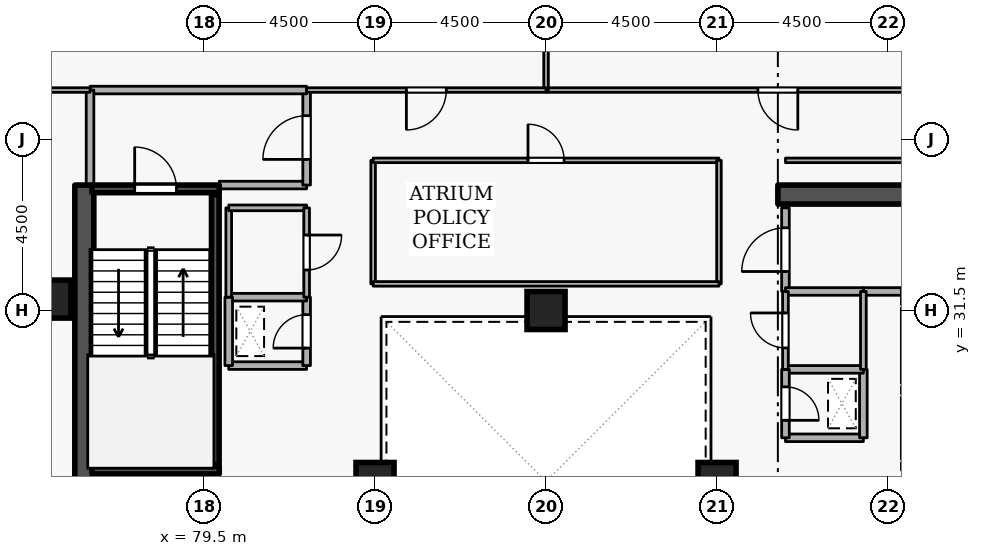
"""IFC4 building model, lengths in metres.
Left out: names, types, materials, properties, quantities, classifications, styles, units other than length and angle.
Written with IfcOpenShell. Run it as: python <this file> out.ifc"""

import sys

from ifc_helpers import new_model, si_unit, direction, frame, frame_2d, origin, origin_2d, place, context, subcontext, project, spatial, rectangle, extrude, element, fill, save


model = new_model("IFC4")
c1 = context("Model", 3, precision=1e-05, world=origin(), true_north=direction((0.0, 1.0)))
c2 = subcontext(c1, "Body", "Model", "MODEL_VIEW")
j1 = project(units=[si_unit("LENGTHUNIT", "METRE"), si_unit("PLANEANGLEUNIT", "RADIAN")], contexts=[c1])
p1 = place(None, origin())
s1 = spatial("IfcSite", under=j1, at=p1, CompositionType="ELEMENT")
p2 = place(p1, origin())
s2 = spatial("IfcBuilding", under=s1, at=p2, CompositionType="ELEMENT")
p3 = place(p2, frame((0.0, 0.0, 203.7)))
s3 = spatial("IfcBuildingStorey", under=s2, at=p3, CompositionType="ELEMENT", Elevation=203.7)
p4 = place(p3, frame((94.6, 34.55, 0.0), z_axis=(0.0, 0.0, 1.0), x_axis=(1.0, 0.0, 0.0)))
e1 = element("IfcWall", 1, at=p4, inside=s3, PredefinedType="SHEAR", context=c2, shape_type="SweptSolid", body=[
    extrude(rectangle(XDim=5.8, YDim=0.5, at=frame_2d((2.9, 0.0))), origin(), (0.0, 0.0, 1.0), 3.6),
])
p5 = place(p3, frame((76.35, 19.2, 0.0), z_axis=(0.0, 0.0, 1.0), x_axis=(0.0, 1.0, 0.0)))
e2 = element("IfcWall", 2, at=p5, inside=s3, PredefinedType="SHEAR", context=c2, shape_type="SweptSolid", body=[
    extrude(rectangle(XDim=15.6, YDim=0.5, at=frame_2d((7.8, 0.0))), origin(), (0.0, 0.0, 1.0), 3.6),
])
for number, where, z_axis, x_axis in (
    (3, (75.5, 31.8, 0.0), (0.0, 0.0, 1.0), (1.0, 0.0, 0.0)),
    (4, (93.0, 27.0, 0.0), (0.0, 0.0, 1.0), (1.0, 0.0, 0.0)),
    (5, (84.0, 27.0, 0.0), (0.0, 0.0, 1.0), (1.0, 0.0, 0.0)),
    (6, (88.5, 31.5, 0.0), (0.0, 0.0, 1.0), (1.0, 0.0, 0.0)),
):
    element("IfcColumn", number, at=place(p3, frame(where, z_axis=z_axis, x_axis=x_axis)), inside=s3, PredefinedType="COLUMN", context=c2, shape_type="SweptSolid", body=[
        extrude(rectangle(XDim=1.0, YDim=1.0, at=origin_2d()), origin(), (0.0, 0.0, 1.0), 3.6),
    ])
p6 = place(p3, frame((97.95, 29.22, 0.0), z_axis=(0.0, 0.0, 1.0), x_axis=(0.0, -1.0, 0.0)))
e7 = element("IfcWall", 7, at=p6, inside=s3, PredefinedType="STANDARD", context=c2, shape_type="SweptSolid", body=[
    extrude(rectangle(XDim=1.64, YDim=0.2, at=frame_2d((0.82, 0.0))), origin(), (0.0, 0.0, 1.0), 3.34),
])
p7 = place(p6, frame((0.31, 0.0, 0.0)))
e8 = element("IfcOpeningElement", 8, at=p7, cuts=e7, PredefinedType="OPENING", context=c2, shape_type="SweptSolid", body=[
    extrude(rectangle(XDim=1.02, YDim=2.06, at=frame_2d((0.51, 1.03))), frame((0.0, 0.11, 0.0), z_axis=(0.0, -1.0, 0.0), x_axis=(1.0, 0.0, 0.0)), (0.0, 0.0, 1.0), 0.22),
])
p8 = place(p3, frame((97.95, 31.57, 0.0), z_axis=(0.0, 0.0, 1.0), x_axis=(0.0, -1.0, 0.0)))
e9 = element("IfcWall", 9, at=p8, inside=s3, PredefinedType="STANDARD", context=c2, shape_type="SweptSolid", body=[
    extrude(rectangle(XDim=1.99, YDim=0.2, at=frame_2d((0.995, 0.0))), origin(), (0.0, 0.0, 1.0), 3.34),
])
p9 = place(p8, frame((0.485, 0.0, 0.0)))
e10 = element("IfcOpeningElement", 10, at=p9, cuts=e9, PredefinedType="OPENING", context=c2, shape_type="SweptSolid", body=[
    extrude(rectangle(XDim=1.02, YDim=2.06, at=frame_2d((0.51, 1.03))), frame((0.0, 0.11, 0.0), z_axis=(0.0, -1.0, 0.0), x_axis=(1.0, 0.0, 0.0)), (0.0, 0.0, 1.0), 0.22),
])
p10 = place(p3, frame((76.55, 34.7, 0.0), z_axis=(0.0, 0.0, 1.0), x_axis=(1.0, 0.0, 0.0)))
e11 = element("IfcWall", 11, at=p10, inside=s3, PredefinedType="SHEAR", context=c2, shape_type="SweptSolid", body=[
    extrude(rectangle(XDim=3.35, YDim=0.2, at=frame_2d((1.675, 0.0))), origin(), (0.0, 0.0, 1.0), 3.6),
])
p11 = place(p10, frame((1.125, 0.0, 0.0)))
e12 = element("IfcOpeningElement", 12, at=p11, cuts=e11, PredefinedType="OPENING", context=c2, shape_type="SweptSolid", body=[
    extrude(rectangle(XDim=1.1, YDim=2.1, at=frame_2d((0.55, 1.05))), frame((0.0, 0.11, 0.0), z_axis=(0.0, -1.0, 0.0), x_axis=(1.0, 0.0, 0.0)), (0.0, 0.0, 1.0), 0.22),
])
p12 = place(p3, frame((79.9, 27.3, 0.0), z_axis=(0.0, 0.0, 1.0), x_axis=(-1.0, 0.0, 0.0)))
e13 = element("IfcWall", 13, at=p12, inside=s3, PredefinedType="SHEAR", context=c2, shape_type="SweptSolid", body=[
    extrude(rectangle(XDim=3.35, YDim=0.2, at=frame_2d((1.675, 0.0))), origin(), (0.0, 0.0, 1.0), 3.6),
])
p13 = place(p3, frame((79.797, 27.45, 0.0), z_axis=(0.0, 0.0, 1.0), x_axis=(0.0, 1.0, 0.0)))
e14 = element("IfcWall", 14, at=p13, inside=s3, PredefinedType="SHEAR", context=c2, shape_type="SweptSolid", body=[
    extrude(rectangle(XDim=7.1, YDim=0.2, at=frame_2d((3.55, 0.0))), origin(), (0.0, 0.0, 1.0), 3.6),
])
p14 = place(p3, frame((79.9, 34.8, 0.0), z_axis=(0.0, 0.0, 1.0), x_axis=(1.0, 0.0, 0.0)))
e15 = element("IfcWall", 15, at=p14, inside=s3, PredefinedType="STANDARD", context=c2, shape_type="SweptSolid", body=[
    extrude(rectangle(XDim=2.3, YDim=0.2, at=frame_2d((1.15, 0.0))), origin(), (0.0, 0.0, 1.0), 2.545),
])
p15 = place(p3, frame((82.2, 34.8, 0.0), z_axis=(0.0, 0.0, 1.0), x_axis=(0.0, 1.0, 0.0)))
e16 = element("IfcWall", 16, at=p15, inside=s3, PredefinedType="STANDARD", context=c2, shape_type="SweptSolid", body=[
    extrude(rectangle(XDim=2.5, YDim=0.2, at=frame_2d((1.25, 0.0))), origin(), (0.0, 0.0, 1.0), 3.34),
])
p16 = place(p15, frame((0.675, 0.0, 0.0)))
e17 = element("IfcOpeningElement", 17, at=p16, cuts=e16, PredefinedType="OPENING", context=c2, shape_type="SweptSolid", body=[
    extrude(rectangle(XDim=1.15, YDim=2.1, at=frame_2d((0.575, 1.05))), frame((0.0, 0.11, 0.0), z_axis=(0.0, -1.0, 0.0), x_axis=(1.0, 0.0, 0.0)), (0.0, 0.0, 1.0), 0.22),
])
p17 = place(p3, frame((82.2, 37.3, 0.0), z_axis=(0.0, 0.0, 1.0), x_axis=(-1.0, 0.0, 0.0)))
e18 = element("IfcWall", 18, at=p17, inside=s3, PredefinedType="STANDARD", context=c2, shape_type="SweptSolid", body=[
    extrude(rectangle(XDim=5.7, YDim=0.2, at=frame_2d((2.85, 0.0))), origin(), (0.0, 0.0, 1.0), 3.34),
])
p18 = place(p3, frame((76.5, 37.3, 0.0), z_axis=(0.0, 0.0, 1.0), x_axis=(0.0, -1.0, 0.0)))
e19 = element("IfcWall", 19, at=p18, inside=s3, PredefinedType="STANDARD", context=c2, shape_type="SweptSolid", body=[
    extrude(rectangle(XDim=2.5, YDim=0.2, at=frame_2d((1.25, 0.0))), origin(), (0.0, 0.0, 1.0), 3.34),
])
p19 = place(p3, frame((94.8, 28.15, 0.0), z_axis=(0.0, 0.0, 1.0), x_axis=(1.0, 0.0, 0.0)))
e20 = element("IfcWall", 20, at=p19, inside=s3, PredefinedType="STANDARD", context=c2, shape_type="SweptSolid", body=[
    extrude(rectangle(XDim=2.05, YDim=0.2, at=frame_2d((1.025, 0.0))), origin(), (0.0, 0.0, 1.0), 3.34),
])
p20 = place(p3, frame((96.85, 28.15, 0.0), z_axis=(0.0, 0.0, 1.0), x_axis=(0.0, 1.0, 0.0)))
e21 = element("IfcWall", 21, at=p20, inside=s3, PredefinedType="STANDARD", context=c2, shape_type="SweptSolid", body=[
    extrude(rectangle(XDim=1.8, YDim=0.2, at=frame_2d((0.9, 0.0))), origin(), (0.0, 0.0, 1.0), 3.34),
])
p21 = place(p3, frame((96.85, 29.95, 0.0), z_axis=(0.0, 0.0, 1.0), x_axis=(-1.0, 0.0, 0.0)))
e22 = element("IfcWall", 22, at=p21, inside=s3, PredefinedType="STANDARD", context=c2, shape_type="SweptSolid", body=[
    extrude(rectangle(XDim=2.05, YDim=0.2, at=frame_2d((1.025, 0.0))), origin(), (0.0, 0.0, 1.0), 3.34),
])
p22 = place(p3, frame((94.8, 29.95, 0.0), z_axis=(0.0, 0.0, 1.0), x_axis=(0.0, -1.0, 0.0)))
e23 = element("IfcWall", 23, at=p22, inside=s3, PredefinedType="STANDARD", context=c2, shape_type="SweptSolid", body=[
    extrude(rectangle(XDim=1.8, YDim=0.2, at=frame_2d((0.9, 0.0))), origin(), (0.0, 0.0, 1.0), 3.34),
])
p23 = place(p22, frame((0.46, 0.0, 0.0)))
e24 = element("IfcOpeningElement", 24, at=p23, cuts=e23, PredefinedType="OPENING", context=c2, shape_type="SweptSolid", body=[
    extrude(rectangle(XDim=0.88, YDim=2.04, at=frame_2d((0.44, 1.02))), frame((0.0, 0.11, 0.0), z_axis=(0.0, -1.0, 0.0), x_axis=(1.0, 0.0, 0.0)), (0.0, 0.0, 1.0), 0.22),
])
p24 = place(p3, frame((80.15, 30.05, 0.0), z_axis=(0.0, 0.0, 1.0), x_axis=(1.0, 0.0, 0.0)))
e25 = element("IfcWall", 25, at=p24, inside=s3, PredefinedType="STANDARD", context=c2, shape_type="SweptSolid", body=[
    extrude(rectangle(XDim=2.05, YDim=0.2, at=frame_2d((1.025, 0.0))), origin(), (0.0, 0.0, 1.0), 3.34),
])
p25 = place(p3, frame((82.2, 30.05, 0.0), z_axis=(0.0, 0.0, 1.0), x_axis=(0.0, 1.0, 0.0)))
e26 = element("IfcWall", 26, at=p25, inside=s3, PredefinedType="STANDARD", context=c2, shape_type="SweptSolid", body=[
    extrude(rectangle(XDim=1.8, YDim=0.2, at=frame_2d((0.9, 0.0))), origin(), (0.0, 0.0, 1.0), 3.34),
])
p26 = place(p25, frame((0.46, 0.0, 0.0)))
e27 = element("IfcOpeningElement", 27, at=p26, cuts=e26, PredefinedType="OPENING", context=c2, shape_type="SweptSolid", body=[
    extrude(rectangle(XDim=0.88, YDim=2.04, at=frame_2d((0.44, 1.02))), frame((0.0, 0.11, 0.0), z_axis=(0.0, -1.0, 0.0), x_axis=(1.0, 0.0, 0.0)), (0.0, 0.0, 1.0), 0.22),
])
p27 = place(p3, frame((82.2, 31.85, 0.0), z_axis=(0.0, 0.0, 1.0), x_axis=(-1.0, 0.0, 0.0)))
e28 = element("IfcWall", 28, at=p27, inside=s3, PredefinedType="STANDARD", context=c2, shape_type="SweptSolid", body=[
    extrude(rectangle(XDim=2.05, YDim=0.2, at=frame_2d((1.025, 0.0))), origin(), (0.0, 0.0, 1.0), 3.34),
])
p28 = place(p3, frame((80.15, 31.85, 0.0), z_axis=(0.0, 0.0, 1.0), x_axis=(0.0, -1.0, 0.0)))
e29 = element("IfcWall", 29, at=p28, inside=s3, PredefinedType="STANDARD", context=c2, shape_type="SweptSolid", body=[
    extrude(rectangle(XDim=1.8, YDim=0.2, at=frame_2d((0.9, 0.0))), origin(), (0.0, 0.0, 1.0), 3.34),
])
p29 = place(p3, frame((94.8, 32.0, 0.0), z_axis=(0.0, 0.0, 1.0), x_axis=(0.0, 1.0, 0.0)))
e30 = element("IfcWall", 30, at=p29, inside=s3, PredefinedType="STANDARD", context=c2, shape_type="SweptSolid", body=[
    extrude(rectangle(XDim=2.2, YDim=0.2, at=frame_2d((1.1, 0.0))), origin(), (0.0, 0.0, 1.0), 3.34),
])
p30 = place(p29, frame((0.525, 0.0, 0.0)))
e31 = element("IfcOpeningElement", 31, at=p30, cuts=e30, PredefinedType="OPENING", context=c2, shape_type="SweptSolid", body=[
    extrude(rectangle(XDim=1.15, YDim=2.1, at=frame_2d((0.575, 1.05))), frame((0.0, 0.11, 0.0), z_axis=(0.0, -1.0, 0.0), x_axis=(1.0, 0.0, 0.0)), (0.0, 0.0, 1.0), 0.22),
])
p31 = place(p3, frame((97.852, 32.0, 0.0), z_axis=(0.0, 0.0, 1.0), x_axis=(-1.0, 0.0, 0.0)))
e32 = element("IfcWall", 32, at=p31, inside=s3, PredefinedType="STANDARD", context=c2, shape_type="SweptSolid", body=[
    extrude(rectangle(XDim=1.002, YDim=0.2, at=frame_2d((0.501, 0.0))), origin(), (0.0, 0.0, 1.0), 3.34),
])
p32 = place(p3, frame((96.85, 32.0, 0.0), z_axis=(0.0, 0.0, 1.0), x_axis=(-1.0, 0.0, 0.0)))
e33 = element("IfcWall", 33, at=p32, inside=s3, PredefinedType="STANDARD", context=c2, shape_type="SweptSolid", body=[
    extrude(rectangle(XDim=2.05, YDim=0.2, at=frame_2d((1.025, 0.0))), origin(), (0.0, 0.0, 1.0), 3.34),
])
p33 = place(p3, frame((94.8, 29.95, 0.0), z_axis=(0.0, 0.0, 1.0), x_axis=(0.0, 1.0, 0.0)))
e34 = element("IfcWall", 34, at=p33, inside=s3, PredefinedType="PARTITIONING", context=c2, shape_type="SweptSolid", body=[
    extrude(rectangle(XDim=2.05, YDim=0.15, at=frame_2d((1.025, 0.0))), origin(), (0.0, 0.0, 1.0), 3.34),
])
p34 = place(p33, frame((0.565, 0.0, 0.0)))
e35 = element("IfcOpeningElement", 35, at=p34, cuts=e34, PredefinedType="OPENING", context=c2, shape_type="SweptSolid", body=[
    extrude(rectangle(XDim=0.92, YDim=2.08, at=frame_2d((0.46, 1.04))), frame((0.0, 0.085, 0.0), z_axis=(0.0, -1.0, 0.0), x_axis=(1.0, 0.0, 0.0)), (0.0, 0.0, 1.0), 0.17),
])
p35 = place(p3, frame((96.85, 32.0, 0.0), z_axis=(0.0, 0.0, 1.0), x_axis=(0.0, -1.0, 0.0)))
e36 = element("IfcWall", 36, at=p35, inside=s3, PredefinedType="PARTITIONING", context=c2, shape_type="SweptSolid", body=[
    extrude(rectangle(XDim=2.05, YDim=0.15, at=frame_2d((1.025, 0.0))), origin(), (0.0, 0.0, 1.0), 3.34),
])
p36 = place(p3, frame((80.15, 31.85, 0.0), z_axis=(0.0, 0.0, 1.0), x_axis=(0.0, 1.0, 0.0)))
e37 = element("IfcWall", 37, at=p36, inside=s3, PredefinedType="PARTITIONING", context=c2, shape_type="SweptSolid", body=[
    extrude(rectangle(XDim=2.35, YDim=0.15, at=frame_2d((1.175, 0.0))), origin(), (0.0, 0.0, 1.0), 3.34),
])
p37 = place(p3, frame((80.15, 34.2, 0.0), z_axis=(0.0, 0.0, 1.0), x_axis=(1.0, 0.0, 0.0)))
e38 = element("IfcWall", 38, at=p37, inside=s3, PredefinedType="PARTITIONING", context=c2, shape_type="SweptSolid", body=[
    extrude(rectangle(XDim=2.05, YDim=0.15, at=frame_2d((1.025, 0.0))), origin(), (0.0, 0.0, 1.0), 2.545),
])
p38 = place(p3, frame((82.2, 34.2, 0.0), z_axis=(0.0, 0.0, 1.0), x_axis=(0.0, -1.0, 0.0)))
e39 = element("IfcWall", 39, at=p38, inside=s3, PredefinedType="PARTITIONING", context=c2, shape_type="SweptSolid", body=[
    extrude(rectangle(XDim=2.35, YDim=0.15, at=frame_2d((1.175, 0.0))), origin(), (0.0, 0.0, 1.0), 3.34),
])
p39 = place(p38, frame((0.715, 0.0, 0.0)))
e40 = element("IfcOpeningElement", 40, at=p39, cuts=e39, PredefinedType="OPENING", context=c2, shape_type="SweptSolid", body=[
    extrude(rectangle(XDim=0.92, YDim=2.08, at=frame_2d((0.46, 1.04))), frame((0.0, 0.085, 0.0), z_axis=(0.0, -1.0, 0.0), x_axis=(1.0, 0.0, 0.0)), (0.0, 0.0, 1.0), 0.17),
])
p40 = place(p3, frame((94.8, 35.45, 0.0), z_axis=(0.0, 0.0, 1.0), x_axis=(1.0, 0.0, 0.0)))
e41 = element("IfcWall", 41, at=p40, inside=s3, PredefinedType="PARTITIONING", context=c2, shape_type="SweptSolid", body=[
    extrude(rectangle(XDim=5.9, YDim=0.12, at=frame_2d((2.95, 0.0))), origin(), (0.0, 0.0, 1.0), 3.34),
])
p41 = place(p3, frame((100.7, 37.3, 0.0), z_axis=(0.0, 0.0, 1.0), x_axis=(-1.0, 0.0, 0.0)))
e42 = element("IfcWall", 42, at=p41, inside=s3, PredefinedType="PARTITIONING", context=c2, shape_type="SweptSolid", body=[
    extrude(rectangle(XDim=12.2, YDim=0.12, at=frame_2d((6.1, 0.0))), origin(), (0.0, 0.0, 1.0), 3.34),
])
p42 = place(p41, frame((5.575, 0.0, 0.0)))
e43 = element("IfcOpeningElement", 43, at=p42, cuts=e42, PredefinedType="OPENING", context=c2, shape_type="SweptSolid", body=[
    extrude(rectangle(XDim=1.05, YDim=2.1, at=frame_2d((0.525, 1.05))), frame((0.0, 0.07, 0.0), z_axis=(0.0, -1.0, 0.0), x_axis=(1.0, 0.0, 0.0)), (0.0, 0.0, 1.0), 0.14),
])
p43 = place(p3, frame((88.5, 37.3, 0.0), z_axis=(0.0, 0.0, 1.0), x_axis=(0.0, 1.0, 0.0)))
e44 = element("IfcWall", 44, at=p43, inside=s3, PredefinedType="PARTITIONING", context=c2, shape_type="SweptSolid", body=[
    extrude(rectangle(XDim=7.42, YDim=0.12, at=frame_2d((3.71, 0.0))), origin(), (0.0, 0.0, 1.0), 2.932),
])
p44 = place(p3, frame((76.5, 37.3, 0.0), z_axis=(0.0, 0.0, 1.0), x_axis=(-1.0, 0.0, 0.0)))
e45 = element("IfcWall", 45, at=p44, inside=s3, PredefinedType="PARTITIONING", context=c2, shape_type="SweptSolid", body=[
    extrude(rectangle(XDim=11.72, YDim=0.12, at=frame_2d((5.86, 0.0))), origin(), (0.0, 0.0, 1.0), 3.34),
])
p45 = place(p3, frame((88.5, 37.3, 0.0), z_axis=(0.0, 0.0, 1.0), x_axis=(-1.0, 0.0, 0.0)))
e46 = element("IfcWall", 46, at=p45, inside=s3, PredefinedType="PARTITIONING", context=c2, shape_type="SweptSolid", body=[
    extrude(rectangle(XDim=6.3, YDim=0.12, at=frame_2d((3.15, 0.0))), origin(), (0.0, 0.0, 1.0), 3.34),
])
p46 = place(p45, frame((2.625, 0.0, 0.0)))
e47 = element("IfcOpeningElement", 47, at=p46, cuts=e46, PredefinedType="OPENING", context=c2, shape_type="SweptSolid", body=[
    extrude(rectangle(XDim=1.05, YDim=2.1, at=frame_2d((0.525, 1.05))), frame((0.0, 0.07, 0.0), z_axis=(0.0, -1.0, 0.0), x_axis=(1.0, 0.0, 0.0)), (0.0, 0.0, 1.0), 0.14),
])
p47 = place(p3, frame((83.95, 32.2, 0.0), z_axis=(0.0, 0.0, 1.0), x_axis=(0.0, 1.0, 0.0)))
e48 = element("IfcWall", 48, at=p47, inside=s3, PredefinedType="PARTITIONING", context=c2, shape_type="SweptSolid", body=[
    extrude(rectangle(XDim=3.25, YDim=0.12, at=frame_2d((1.625, 0.0))), origin(), (0.0, 0.0, 1.0), 3.34),
])
p48 = place(p3, frame((83.95, 35.45, 0.0), z_axis=(0.0, 0.0, 1.0), x_axis=(1.0, 0.0, 0.0)))
e49 = element("IfcWall", 49, at=p48, inside=s3, PredefinedType="PARTITIONING", context=c2, shape_type="SweptSolid", body=[
    extrude(rectangle(XDim=9.1, YDim=0.12, at=frame_2d((4.55, 0.0))), origin(), (0.0, 0.0, 1.0), 3.34),
])
p49 = place(p48, frame((4.075, 0.0, 0.0)))
e50 = element("IfcOpeningElement", 50, at=p49, cuts=e49, PredefinedType="OPENING", context=c2, shape_type="SweptSolid", body=[
    extrude(rectangle(XDim=0.95, YDim=2.1, at=frame_2d((0.475, 1.05))), frame((0.0, 0.07, 0.0), z_axis=(0.0, -1.0, 0.0), x_axis=(1.0, 0.0, 0.0)), (0.0, 0.0, 1.0), 0.14),
])
p50 = place(p3, frame((93.05, 35.45, 0.0), z_axis=(0.0, 0.0, 1.0), x_axis=(0.0, -1.0, 0.0)))
e51 = element("IfcWall", 51, at=p50, inside=s3, PredefinedType="PARTITIONING", context=c2, shape_type="SweptSolid", body=[
    extrude(rectangle(XDim=3.25, YDim=0.12, at=frame_2d((1.625, 0.0))), origin(), (0.0, 0.0, 1.0), 3.34),
])
p51 = place(p3, frame((93.05, 32.2, 0.0), z_axis=(0.0, 0.0, 1.0), x_axis=(-1.0, 0.0, 0.0)))
e52 = element("IfcWall", 52, at=p51, inside=s3, PredefinedType="PARTITIONING", context=c2, shape_type="SweptSolid", body=[
    extrude(rectangle(XDim=9.1, YDim=0.12, at=frame_2d((4.55, 0.0))), origin(), (0.0, 0.0, 1.0), 3.34),
])
p52 = place(p11, origin())
e53 = element("IfcDoor", 53, at=p52, inside=s3, OperationType="SINGLE_SWING_LEFT", PredefinedType="DOOR", context=c2, shape_type="SweptSolid", body=[
    extrude(rectangle(XDim=1.1, YDim=2.1, at=frame_2d((0.55, 1.05))), frame((0.0, 0.025, 0.0), z_axis=(0.0, -1.0, 0.0), x_axis=(1.0, 0.0, 0.0)), (0.0, 0.0, 1.0), 0.05),
])
fill(e12, e53)
p53 = place(p16, origin())
e54 = element("IfcDoor", 54, at=p53, inside=s3, OperationType="SINGLE_SWING_LEFT", PredefinedType="DOOR", context=c2, shape_type="SweptSolid", body=[
    extrude(rectangle(XDim=1.15, YDim=2.1, at=frame_2d((0.575, 1.05))), frame((0.0, 0.025, 0.0), z_axis=(0.0, -1.0, 0.0), x_axis=(1.0, 0.0, 0.0)), (0.0, 0.0, 1.0), 0.05),
])
fill(e17, e54)
p54 = place(p23, origin())
e55 = element("IfcDoor", 55, at=p54, inside=s3, OperationType="SINGLE_SWING_RIGHT", PredefinedType="DOOR", context=c2, shape_type="SweptSolid", body=[
    extrude(rectangle(XDim=0.88, YDim=2.04, at=frame_2d((0.44, 1.02))), frame((0.0, 0.025, 0.0), z_axis=(0.0, -1.0, 0.0), x_axis=(1.0, 0.0, 0.0)), (0.0, 0.0, 1.0), 0.05),
])
fill(e24, e55)
p55 = place(p26, origin())
e56 = element("IfcDoor", 56, at=p55, inside=s3, OperationType="SINGLE_SWING_LEFT", PredefinedType="DOOR", context=c2, shape_type="SweptSolid", body=[
    extrude(rectangle(XDim=0.88, YDim=2.04, at=frame_2d((0.44, 1.02))), frame((0.0, 0.025, 0.0), z_axis=(0.0, -1.0, 0.0), x_axis=(1.0, 0.0, 0.0)), (0.0, 0.0, 1.0), 0.05),
])
fill(e27, e56)
p56 = place(p34, origin())
e57 = element("IfcDoor", 57, at=p56, inside=s3, OperationType="SINGLE_SWING_RIGHT", PredefinedType="DOOR", context=c2, shape_type="SweptSolid", body=[
    extrude(rectangle(XDim=0.92, YDim=2.08, at=frame_2d((0.46, 1.04))), frame((0.0, 0.025, 0.0), z_axis=(0.0, -1.0, 0.0), x_axis=(1.0, 0.0, 0.0)), (0.0, 0.0, 1.0), 0.05),
])
fill(e35, e57)
p57 = place(p30, origin())
e58 = element("IfcDoor", 58, at=p57, inside=s3, OperationType="SINGLE_SWING_LEFT", PredefinedType="DOOR", context=c2, shape_type="SweptSolid", body=[
    extrude(rectangle(XDim=1.15, YDim=2.1, at=frame_2d((0.575, 1.05))), frame((0.0, 0.025, 0.0), z_axis=(0.0, -1.0, 0.0), x_axis=(1.0, 0.0, 0.0)), (0.0, 0.0, 1.0), 0.05),
])
fill(e31, e58)
p58 = place(p39, origin())
e59 = element("IfcDoor", 59, at=p58, inside=s3, OperationType="SINGLE_SWING_LEFT", PredefinedType="DOOR", context=c2, shape_type="SweptSolid", body=[
    extrude(rectangle(XDim=0.92, YDim=2.08, at=frame_2d((0.46, 1.04))), frame((0.0, 0.025, 0.0), z_axis=(0.0, -1.0, 0.0), x_axis=(1.0, 0.0, 0.0)), (0.0, 0.0, 1.0), 0.05),
])
fill(e40, e59)
p59 = place(p42, origin())
e60 = element("IfcDoor", 60, at=p59, inside=s3, OperationType="SINGLE_SWING_LEFT", PredefinedType="DOOR", context=c2, shape_type="SweptSolid", body=[
    extrude(rectangle(XDim=1.05, YDim=2.1, at=frame_2d((0.525, 1.05))), frame((0.0, 0.025, 0.0), z_axis=(0.0, -1.0, 0.0), x_axis=(1.0, 0.0, 0.0)), (0.0, 0.0, 1.0), 0.05),
])
fill(e43, e60)
p60 = place(p46, origin())
e61 = element("IfcDoor", 61, at=p60, inside=s3, OperationType="SINGLE_SWING_RIGHT", PredefinedType="DOOR", context=c2, shape_type="SweptSolid", body=[
    extrude(rectangle(XDim=1.05, YDim=2.1, at=frame_2d((0.525, 1.05))), frame((0.0, 0.025, 0.0), z_axis=(0.0, -1.0, 0.0), x_axis=(1.0, 0.0, 0.0)), (0.0, 0.0, 1.0), 0.05),
])
fill(e47, e61)
p61 = place(p49, origin())
e62 = element("IfcDoor", 62, at=p61, inside=s3, OperationType="SINGLE_SWING_LEFT", PredefinedType="DOOR", context=c2, shape_type="SweptSolid", body=[
    extrude(rectangle(XDim=0.95, YDim=2.1, at=frame_2d((0.475, 1.05))), frame((0.0, 0.025, 0.0), z_axis=(0.0, -1.0, 0.0), x_axis=(1.0, 0.0, 0.0)), (0.0, 0.0, 1.0), 0.05),
])
fill(e50, e62)
save(model, sys.argv[1])
